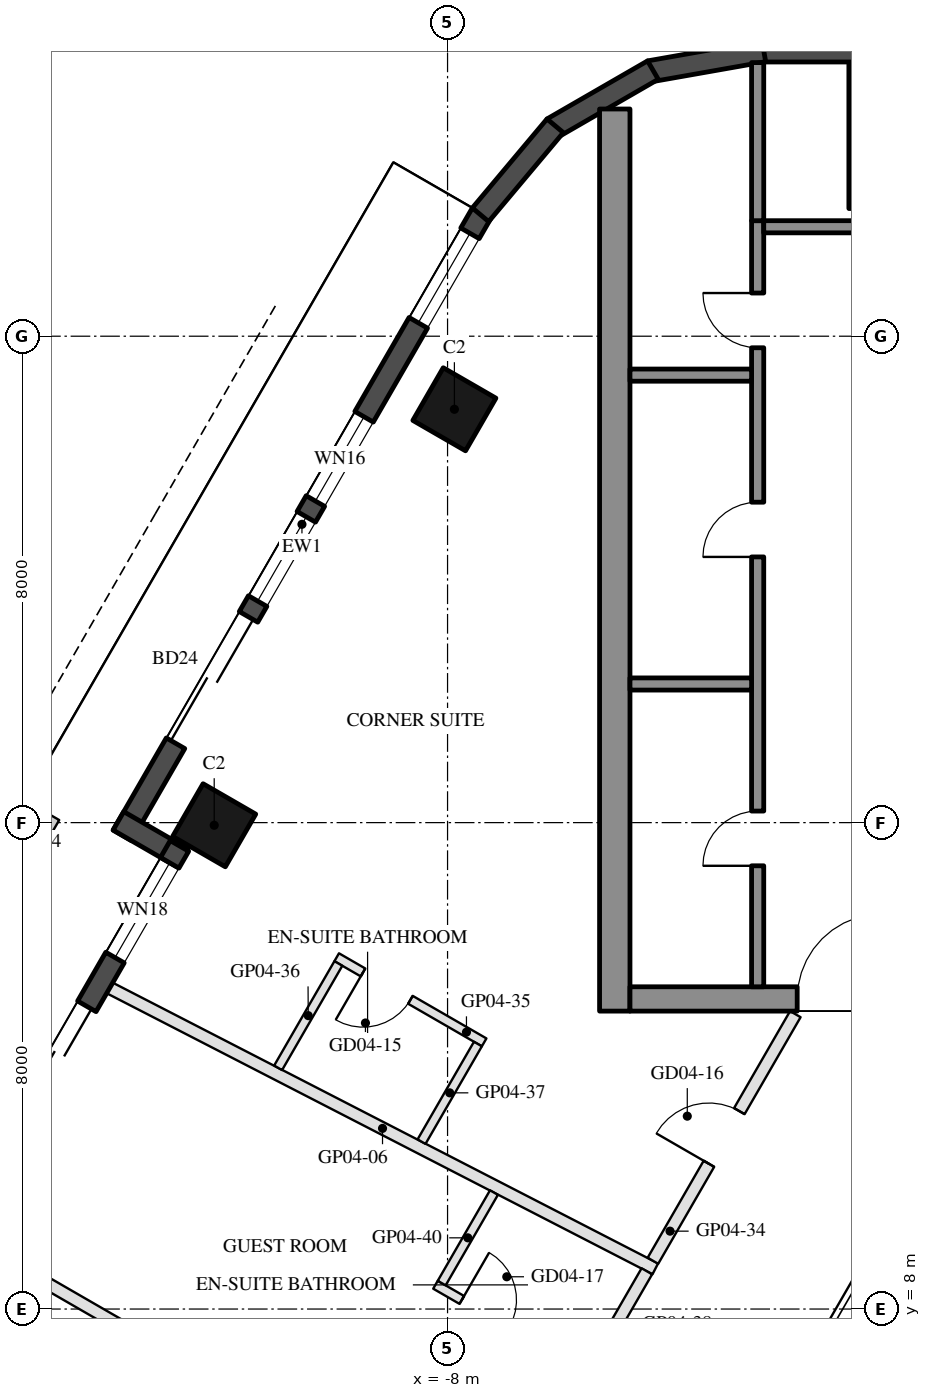
"""IFC4 building model, lengths in metres.
Left out: names, types, materials, properties, quantities, classifications, styles, units other than length and angle.
Written with IfcOpenShell. Run it as: python <this file> out.ifc"""

import sys

from ifc_helpers import new_model, si_unit, direction, frame, frame_2d, origin, origin_2d, place, context, subcontext, project, spatial, rectangle, hollow_rectangle, extrude, element, fill, save


model = new_model("IFC4")
c1 = context("Model", 3, precision=1e-05, world=origin(), true_north=direction((0.0, 1.0)))
c2 = subcontext(c1, "Body", "Model", "MODEL_VIEW")
j1 = project(units=[si_unit("LENGTHUNIT", "METRE"), si_unit("PLANEANGLEUNIT", "RADIAN")], contexts=[c1])
p1 = place(None, origin())
s1 = spatial("IfcSite", under=j1, at=p1, CompositionType="ELEMENT")
p2 = place(p1, origin())
s2 = spatial("IfcBuilding", under=s1, at=p2, CompositionType="ELEMENT")
p3 = place(p2, frame((0.0, 0.0, 76.1)))
s3 = spatial("IfcBuildingStorey", under=s2, at=p3, CompositionType="ELEMENT", Elevation=76.1)
for number, where, z_axis, x_axis in (
    (1, (-7.888, 22.798, 0.0), (0.0, 0.0, 1.0), (0.5, 0.866, 0.0)),
    (2, (-11.838, 15.957, 0.0), (0.0, 0.0, 1.0), (0.5, 0.866, 0.0)),
):
    element("IfcColumn", number, at=place(p3, frame(where, z_axis=z_axis, x_axis=x_axis)), inside=s3, PredefinedType="COLUMN", context=c2, shape_type="SweptSolid", body=[
        extrude(hollow_rectangle(XDim=1.0, YDim=1.0, WallThickness=0.045, at=origin_2d()), origin(), (0.0, 0.0, 1.0), 3.7),
    ])
p4 = place(p3, frame((0.0, 27.3, 0.0), z_axis=(0.0, 0.0, 1.0), x_axis=(1.0, 0.0, 0.0)))
e3 = element("IfcColumn", 3, at=p4, inside=s3, PredefinedType="COLUMN", context=c2, shape_type="SweptSolid", body=[
    extrude(hollow_rectangle(XDim=2.8, YDim=2.4, WallThickness=0.07, at=origin_2d()), origin(), (0.0, 0.0, 1.0), 3.7),
])
p5 = place(p3, frame((-7.441, 26.022, 0.0), z_axis=(0.0, 0.0, 1.0), x_axis=(-0.499992533062, -0.86602971478, 0.0)))
e4 = element("IfcWall", 4, at=p5, inside=s3, PredefinedType="SOLIDWALL", context=c2, shape_type="SweptSolid", body=[
    extrude(rectangle(XDim=11.816, YDim=0.35, at=frame_2d((5.908, 0.0))), origin(), (0.0, 0.0, 1.0), 3.55),
])
p6 = place(p5, frame((0.381, 0.0, 0.3)))
e5 = element("IfcOpeningElement", 5, at=p6, cuts=e4, PredefinedType="OPENING", context=c2, shape_type="SweptSolid", body=[
    extrude(rectangle(XDim=1.7, YDim=2.65, at=frame_2d((0.85, 1.325))), frame((0.0, 0.185, 0.0), z_axis=(0.0, -1.0, 0.0), x_axis=(1.0, 0.0, 0.0)), (0.0, 0.0, 1.0), 0.37),
])
p7 = place(p5, frame((7.666, 0.0, 0.0)))
e6 = element("IfcOpeningElement", 6, at=p7, cuts=e4, PredefinedType="OPENING", context=c2, shape_type="SweptSolid", body=[
    extrude(rectangle(XDim=2.4, YDim=2.4, at=frame_2d((1.2, 1.2))), frame((0.0, 0.185, 0.0), z_axis=(0.0, -1.0, 0.0), x_axis=(1.0, 0.0, 0.0)), (0.0, 0.0, 1.0), 0.37),
])
p8 = place(p5, frame((3.865, 0.0, 0.3)))
e7 = element("IfcOpeningElement", 7, at=p8, cuts=e4, PredefinedType="OPENING", context=c2, shape_type="SweptSolid", body=[
    extrude(rectangle(XDim=1.6, YDim=2.65, at=frame_2d((0.8, 1.325))), frame((0.0, 0.185, 0.0), z_axis=(0.0, -1.0, 0.0), x_axis=(1.0, 0.0, 0.0)), (0.0, 0.0, 1.0), 0.37),
])
p9 = place(p5, frame((5.765, 0.0, 0.3)))
e8 = element("IfcOpeningElement", 8, at=p9, cuts=e4, PredefinedType="OPENING", context=c2, shape_type="SweptSolid", body=[
    extrude(rectangle(XDim=1.6, YDim=2.65, at=frame_2d((0.8, 1.325))), frame((0.0, 0.185, 0.0), z_axis=(0.0, -1.0, 0.0), x_axis=(1.0, 0.0, 0.0)), (0.0, 0.0, 1.0), 0.37),
])
p10 = place(p3, frame((-13.413, 16.029, 0.0), z_axis=(0.0, 0.0, 1.0), x_axis=(0.866005645448, -0.500034220881, 0.0)))
e9 = element("IfcWall", 9, at=p10, inside=s3, PredefinedType="SOLIDWALL", context=c2, shape_type="SweptSolid", body=[
    extrude(rectangle(XDim=1.22, YDim=0.35, at=frame_2d((0.61, 0.0))), origin(), (0.0, 0.0, 1.0), 3.55),
])
p11 = place(p3, frame((-12.409, 15.617, 0.0), z_axis=(0.0, 0.0, 1.0), x_axis=(-0.500003597184, -0.866023326939, 0.0)))
e10 = element("IfcWall", 10, at=p11, inside=s3, PredefinedType="SOLIDWALL", context=c2, shape_type="SweptSolid", body=[
    extrude(rectangle(XDim=6.74, YDim=0.35, at=frame_2d((3.37, 0.0))), origin(), (0.0, 0.0, 1.0), 3.55),
])
p12 = place(p11, frame((0.32, 0.0, 0.3)))
e11 = element("IfcOpeningElement", 11, at=p12, cuts=e10, PredefinedType="OPENING", context=c2, shape_type="SweptSolid", body=[
    extrude(rectangle(XDim=1.8, YDim=2.65, at=frame_2d((0.9, 1.325))), frame((0.0, 0.185, 0.0), z_axis=(0.0, -1.0, 0.0), x_axis=(1.0, 0.0, 0.0)), (0.0, 0.0, 1.0), 0.37),
])
p13 = place(p11, frame((3.047, 0.0, 0.0)))
e12 = element("IfcOpeningElement", 12, at=p13, cuts=e10, PredefinedType="OPENING", context=c2, shape_type="SweptSolid", body=[
    extrude(rectangle(XDim=1.8, YDim=2.4, at=frame_2d((0.9, 1.2))), frame((0.0, 0.185, 0.0), z_axis=(0.0, -1.0, 0.0), x_axis=(1.0, 0.0, 0.0)), (0.0, 0.0, 1.0), 0.37),
])
p14 = place(p11, frame((5.147, 0.0, 0.3)))
e13 = element("IfcOpeningElement", 13, at=p14, cuts=e10, PredefinedType="OPENING", context=c2, shape_type="SweptSolid", body=[
    extrude(rectangle(XDim=0.8, YDim=2.65, at=frame_2d((0.4, 1.325))), frame((0.0, 0.185, 0.0), z_axis=(0.0, -1.0, 0.0), x_axis=(1.0, 0.0, 0.0)), (0.0, 0.0, 1.0), 0.37),
])
p15 = place(p3, frame((2.829, 28.685, 0.0), z_axis=(0.0, 0.0, 1.0), x_axis=(-1.0, 0.0, 0.0)))
e14 = element("IfcWall", 14, at=p15, inside=s3, PredefinedType="SOLIDWALL", context=c2, shape_type="SweptSolid", body=[
    extrude(rectangle(XDim=5.658, YDim=0.35, at=frame_2d((2.829, 0.0))), origin(), (0.0, 0.0, 1.0), 3.55),
])
for number, where, z_axis, x_axis in (
    (15, (-2.799, 28.688, 0.0), (0.0, 0.0, 1.0), (-0.985, -0.174, 0.0)),
    (16, (-4.623, 28.377, 0.0), (0.0, 0.0, 1.0), (-0.866, -0.5, 0.0)),
):
    element("IfcWall", number, at=place(p3, frame(where, z_axis=z_axis, x_axis=x_axis)), inside=s3, PredefinedType="SOLIDWALL", context=c2, shape_type="SweptSolid", body=[
        extrude(rectangle(XDim=1.91, YDim=0.35, at=frame_2d((0.955, 0.0))), origin(), (0.0, 0.0, 1.0), 3.55),
    ])
p16 = place(p3, frame((-6.23, 27.461, 0.0), z_axis=(0.0, 0.0, 1.0), x_axis=(-0.642808304945, -0.766027077259, 0.0)))
e17 = element("IfcWall", 17, at=p16, inside=s3, PredefinedType="SOLIDWALL", context=c2, shape_type="SweptSolid", body=[
    extrude(rectangle(XDim=1.91, YDim=0.35, at=frame_2d((0.955, 0.0))), origin(), (0.0, 0.0, 1.0), 3.55),
])
p17 = place(p3, frame((-5.25, 12.9, 0.0), z_axis=(0.0, 0.0, 1.0), x_axis=(0.0, 1.0, 0.0)))
e18 = element("IfcWall", 18, at=p17, inside=s3, PredefinedType="SHEAR", context=c2, shape_type="SweptSolid", body=[
    extrude(rectangle(XDim=14.837, YDim=0.5, at=frame_2d((7.418, 0.0))), origin(), (0.0, 0.0, 1.0), 3.5),
])
p18 = place(p3, frame((5.0, 13.1, 0.0), z_axis=(0.0, 0.0, 1.0), x_axis=(-1.0, 0.0, 0.0)))
e19 = element("IfcWall", 19, at=p18, inside=s3, PredefinedType="SHEAR", context=c2, shape_type="SweptSolid", body=[
    extrude(rectangle(XDim=10.0, YDim=0.4, at=frame_2d((5.0, 0.0))), origin(), (0.0, 0.0, 1.0), 3.5),
])
p19 = place(p18, frame((3.55, 0.0, 0.0)))
e20 = element("IfcOpeningElement", 20, at=p19, cuts=e19, PredefinedType="OPENING", context=c2, shape_type="SweptSolid", body=[
    extrude(rectangle(XDim=1.1, YDim=2.1, at=frame_2d((0.55, 1.05))), frame((0.0, 0.21, 0.0), z_axis=(0.0, -1.0, 0.0), x_axis=(1.0, 0.0, 0.0)), (0.0, 0.0, 1.0), 0.42),
])
p20 = place(p18, frame((5.85, 0.0, 0.0)))
e21 = element("IfcOpeningElement", 21, at=p20, cuts=e19, PredefinedType="OPENING", context=c2, shape_type="SweptSolid", body=[
    extrude(rectangle(XDim=1.4, YDim=2.1, at=frame_2d((0.7, 1.05))), frame((0.0, 0.21, 0.0), z_axis=(0.0, -1.0, 0.0), x_axis=(1.0, 0.0, 0.0)), (0.0, 0.0, 1.0), 0.42),
])
p21 = place(p3, frame((-2.9, 13.3, 0.0), z_axis=(0.0, 0.0, 1.0), x_axis=(0.0, 1.0, 0.0)))
e22 = element("IfcWall", 22, at=p21, inside=s3, PredefinedType="SHEAR", context=c2, shape_type="SweptSolid", body=[
    extrude(rectangle(XDim=12.6, YDim=0.2, at=frame_2d((6.3, 0.0))), origin(), (0.0, 0.0, 1.0), 3.5),
])
p22 = place(p21, frame((1.99, 0.0, 0.0)))
e23 = element("IfcOpeningElement", 23, at=p22, cuts=e22, PredefinedType="OPENING", context=c2, shape_type="SweptSolid", body=[
    extrude(rectangle(XDim=0.9, YDim=2.1, at=frame_2d((0.45, 1.05))), frame((0.0, 0.11, 0.0), z_axis=(0.0, -1.0, 0.0), x_axis=(1.0, 0.0, 0.0)), (0.0, 0.0, 1.0), 0.22),
])
p23 = place(p21, frame((7.07, 0.0, 0.0)))
e24 = element("IfcOpeningElement", 24, at=p23, cuts=e22, PredefinedType="OPENING", context=c2, shape_type="SweptSolid", body=[
    extrude(rectangle(XDim=0.9, YDim=2.1, at=frame_2d((0.45, 1.05))), frame((0.0, 0.11, 0.0), z_axis=(0.0, -1.0, 0.0), x_axis=(1.0, 0.0, 0.0)), (0.0, 0.0, 1.0), 0.22),
])
p24 = place(p21, frame((10.51, 0.0, 0.0)))
e25 = element("IfcOpeningElement", 25, at=p24, cuts=e22, PredefinedType="OPENING", context=c2, shape_type="SweptSolid", body=[
    extrude(rectangle(XDim=0.9, YDim=2.1, at=frame_2d((0.45, 1.05))), frame((0.0, 0.11, 0.0), z_axis=(0.0, -1.0, 0.0), x_axis=(1.0, 0.0, 0.0)), (0.0, 0.0, 1.0), 0.22),
])
p25 = place(p3, frame((-0.4, 25.8, 0.0), z_axis=(0.0, 0.0, 1.0), x_axis=(-1.0, 0.0, 0.0)))
e26 = element("IfcWall", 26, at=p25, inside=s3, PredefinedType="SHEAR", context=c2, shape_type="SweptSolid", body=[
    extrude(rectangle(XDim=2.4, YDim=0.2, at=frame_2d((1.2, 0.0))), origin(), (0.0, 0.0, 1.0), 3.5),
])
for number, where, z_axis, x_axis in (
    (27, (-3.0, 18.28, 0.0), (0.0, 0.0, 1.0), (-1.0, 0.0, 0.0)),
    (28, (-3.0, 23.36, 0.0), (0.0, 0.0, 1.0), (-1.0, 0.0, 0.0)),
):
    element("IfcWall", number, at=place(p3, frame(where, z_axis=z_axis, x_axis=x_axis)), inside=s3, PredefinedType="SHEAR", context=c2, shape_type="SweptSolid", body=[
        extrude(rectangle(XDim=2.0, YDim=0.2, at=frame_2d((1.0, 0.0))), origin(), (0.0, 0.0, 1.0), 3.5),
    ])
p26 = place(p3, frame((-2.9, 25.9, 0.0), z_axis=(0.0, 0.0, 1.0), x_axis=(0.0, 1.0, 0.0)))
e29 = element("IfcWall", 29, at=p26, inside=s3, PredefinedType="SHEAR", context=c2, shape_type="SweptSolid", body=[
    extrude(rectangle(XDim=2.6, YDim=0.2, at=frame_2d((1.3, 0.0))), origin(), (0.0, 0.0, 1.0), 3.5),
])
p27 = place(p3, frame((-13.556, 13.281, 0.0), z_axis=(0.0, 0.0, 1.0), x_axis=(0.889110909618, -0.457691807223, 0.0)))
e30 = element("IfcWall", 30, at=p27, inside=s3, PredefinedType="PARTITIONING", context=c2, shape_type="SweptSolid", body=[
    extrude(rectangle(XDim=10.092, YDim=0.2, at=frame_2d((5.046, 0.0))), origin(), (0.0, 0.0, 1.0), 2.96),
])
p28 = place(p3, frame((-15.354, 8.865, 0.0), z_axis=(0.0, 0.0, 1.0), x_axis=(0.866018301787, -0.500012300819, 0.0)))
e31 = element("IfcWall", 31, at=p28, inside=s3, PredefinedType="PARTITIONING", context=c2, shape_type="SweptSolid", body=[
    extrude(rectangle(XDim=9.43, YDim=0.2, at=frame_2d((4.715, 0.0))), origin(), (0.0, 0.0, 1.0), 2.95),
])
p29 = place(p3, frame((-4.622, 8.794, 0.0), z_axis=(0.0, 0.0, 1.0), x_axis=(0.499979668266, 0.866037141998, 0.0)))
e32 = element("IfcWall", 32, at=p29, inside=s3, PredefinedType="PARTITIONING", context=c2, shape_type="SweptSolid", body=[
    extrude(rectangle(XDim=4.683, YDim=0.2, at=frame_2d((2.342, 0.0))), origin(), (0.0, 0.0, 1.0), 2.95),
])
p30 = place(p29, frame((1.842, 0.0, 0.0)))
e33 = element("IfcOpeningElement", 33, at=p30, cuts=e32, PredefinedType="OPENING", context=c2, shape_type="SweptSolid", body=[
    extrude(rectangle(XDim=1.0, YDim=2.1, at=frame_2d((0.5, 1.05))), frame((0.0, 0.11, 0.0), z_axis=(0.0, -1.0, 0.0), x_axis=(1.0, 0.0, 0.0)), (0.0, 0.0, 1.0), 0.22),
])
p31 = place(p3, frame((-7.398, 12.386, 0.0), z_axis=(0.0, 0.0, 1.0), x_axis=(-0.866034573852, 0.49998411664, 0.0)))
e34 = element("IfcWall", 34, at=p31, inside=s3, PredefinedType="PARTITIONING", context=c2, shape_type="SweptSolid", body=[
    extrude(rectangle(XDim=2.8, YDim=0.15, at=frame_2d((1.4, 0.0))), origin(), (0.0, 0.0, 1.0), 3.55),
])
p32 = place(p31, frame((1.4, 0.0, 0.0)))
e35 = element("IfcOpeningElement", 35, at=p32, cuts=e34, PredefinedType="OPENING", context=c2, shape_type="SweptSolid", body=[
    extrude(rectangle(XDim=0.9, YDim=2.1, at=frame_2d((0.45, 1.05))), frame((0.0, 0.085, 0.0), z_axis=(0.0, -1.0, 0.0), x_axis=(1.0, 0.0, 0.0)), (0.0, 0.0, 1.0), 0.17),
])
p33 = place(p3, frame((-9.796, 13.683, 0.0), z_axis=(0.0, 0.0, 1.0), x_axis=(-0.499981976687, -0.866035809299, 0.0)))
e36 = element("IfcWall", 36, at=p33, inside=s3, PredefinedType="PARTITIONING", context=c2, shape_type="SweptSolid", body=[
    extrude(rectangle(XDim=1.981, YDim=0.15, at=frame_2d((0.991, 0.0))), origin(), (0.0, 0.0, 1.0), 3.55),
])
p34 = place(p3, frame((-7.501, 12.358, 0.0), z_axis=(0.0, 0.0, 1.0), x_axis=(-0.499992292652, -0.866029853578, 0.0)))
e37 = element("IfcWall", 37, at=p34, inside=s3, PredefinedType="PARTITIONING", context=c2, shape_type="SweptSolid", body=[
    extrude(rectangle(XDim=1.854, YDim=0.15, at=frame_2d((0.927, 0.0))), origin(), (0.0, 0.0, 1.0), 3.55),
])
p35 = place(p3, frame((-7.225, 4.287, 0.0), z_axis=(0.0, 0.0, 1.0), x_axis=(0.49997441339, 0.866040175716, 0.0)))
e38 = element("IfcWall", 38, at=p35, inside=s3, PredefinedType="PARTITIONING", context=c2, shape_type="SweptSolid", body=[
    extrude(rectangle(XDim=5.005, YDim=0.2, at=frame_2d((2.502, 0.0))), origin(), (0.0, 0.0, 1.0), 2.95),
])
p36 = place(p35, frame((1.55, 0.0, 0.0)))
e39 = element("IfcOpeningElement", 39, at=p36, cuts=e38, PredefinedType="OPENING", context=c2, shape_type="SweptSolid", body=[
    extrude(rectangle(XDim=1.0, YDim=2.1, at=frame_2d((0.5, 1.05))), frame((0.0, 0.11, 0.0), z_axis=(0.0, -1.0, 0.0), x_axis=(1.0, 0.0, 0.0)), (0.0, 0.0, 1.0), 0.22),
])
p37 = place(p3, frame((-8.198, 8.399, 0.0), z_axis=(0.0, 0.0, 1.0), x_axis=(0.866034573852, -0.49998411664, 0.0)))
e40 = element("IfcWall", 40, at=p37, inside=s3, PredefinedType="PARTITIONING", context=c2, shape_type="SweptSolid", body=[
    extrude(rectangle(XDim=2.8, YDim=0.15, at=frame_2d((1.4, 0.0))), origin(), (0.0, 0.0, 1.0), 3.55),
])
p38 = place(p37, frame((0.5, 0.0, 0.0)))
e41 = element("IfcOpeningElement", 41, at=p38, cuts=e40, PredefinedType="OPENING", context=c2, shape_type="SweptSolid", body=[
    extrude(rectangle(XDim=0.9, YDim=2.1, at=frame_2d((0.45, 1.05))), frame((0.0, 0.085, 0.0), z_axis=(0.0, -1.0, 0.0), x_axis=(1.0, 0.0, 0.0)), (0.0, 0.0, 1.0), 0.17),
])
p39 = place(p3, frame((-7.237, 9.915, 0.0), z_axis=(0.0, 0.0, 1.0), x_axis=(-0.50005036918, -0.865996321171, 0.0)))
e42 = element("IfcWall", 42, at=p39, inside=s3, PredefinedType="PARTITIONING", context=c2, shape_type="SweptSolid", body=[
    extrude(rectangle(XDim=1.719, YDim=0.15, at=frame_2d((0.859, 0.0))), origin(), (0.0, 0.0, 1.0), 2.95),
])
p40 = place(p6, origin())
e43 = element("IfcWindow", 43, at=p40, inside=s3, PartitioningType="SINGLE_PANEL", PredefinedType="WINDOW", context=c2, shape_type="SweptSolid", body=[
    extrude(rectangle(XDim=1.7, YDim=2.65, at=frame_2d((0.85, 1.325))), frame((0.0, 0.03, 0.0), z_axis=(0.0, -1.0, 0.0), x_axis=(1.0, 0.0, 0.0)), (0.0, 0.0, 1.0), 0.06),
])
fill(e5, e43)
p41 = place(p7, frame((2.4, 0.0, 0.0), z_axis=(0.0, 0.0, 1.0), x_axis=(-1.0, 0.0, 0.0)))
e44 = element("IfcDoor", 44, at=p41, inside=s3, OperationType="SLIDING_TO_LEFT", PredefinedType="DOOR", context=c2, shape_type="SweptSolid", body=[
    extrude(rectangle(XDim=2.4, YDim=2.4, at=frame_2d((1.2, 1.2))), frame((0.0, 0.025, 0.0), z_axis=(0.0, -1.0, 0.0), x_axis=(1.0, 0.0, 0.0)), (0.0, 0.0, 1.0), 0.05),
])
fill(e6, e44)
p42 = place(p8, origin())
e45 = element("IfcWindow", 45, at=p42, inside=s3, PartitioningType="SINGLE_PANEL", PredefinedType="WINDOW", context=c2, shape_type="SweptSolid", body=[
    extrude(rectangle(XDim=1.6, YDim=2.65, at=frame_2d((0.8, 1.325))), frame((0.0, 0.03, 0.0), z_axis=(0.0, -1.0, 0.0), x_axis=(1.0, 0.0, 0.0)), (0.0, 0.0, 1.0), 0.06),
])
fill(e7, e45)
p43 = place(p9, origin())
e46 = element("IfcWindow", 46, at=p43, inside=s3, PartitioningType="SINGLE_PANEL", PredefinedType="WINDOW", context=c2, shape_type="SweptSolid", body=[
    extrude(rectangle(XDim=1.6, YDim=2.65, at=frame_2d((0.8, 1.325))), frame((0.0, 0.03, 0.0), z_axis=(0.0, -1.0, 0.0), x_axis=(1.0, 0.0, 0.0)), (0.0, 0.0, 1.0), 0.06),
])
fill(e8, e46)
p44 = place(p12, origin())
e47 = element("IfcWindow", 47, at=p44, inside=s3, PartitioningType="SINGLE_PANEL", PredefinedType="WINDOW", context=c2, shape_type="SweptSolid", body=[
    extrude(rectangle(XDim=1.8, YDim=2.65, at=frame_2d((0.9, 1.325))), frame((0.0, 0.03, 0.0), z_axis=(0.0, -1.0, 0.0), x_axis=(1.0, 0.0, 0.0)), (0.0, 0.0, 1.0), 0.06),
])
fill(e11, e47)
p45 = place(p13, frame((1.8, 0.0, 0.0), z_axis=(0.0, 0.0, 1.0), x_axis=(-1.0, 0.0, 0.0)))
e48 = element("IfcDoor", 48, at=p45, inside=s3, OperationType="SLIDING_TO_LEFT", PredefinedType="DOOR", context=c2, shape_type="SweptSolid", body=[
    extrude(rectangle(XDim=1.8, YDim=2.4, at=frame_2d((0.9, 1.2))), frame((0.0, 0.025, 0.0), z_axis=(0.0, -1.0, 0.0), x_axis=(1.0, 0.0, 0.0)), (0.0, 0.0, 1.0), 0.05),
])
fill(e12, e48)
p46 = place(p22, origin())
e49 = element("IfcDoor", 49, at=p46, inside=s3, OperationType="SINGLE_SWING_LEFT", PredefinedType="DOOR", context=c2, shape_type="SweptSolid", body=[
    extrude(rectangle(XDim=0.9, YDim=2.1, at=frame_2d((0.45, 1.05))), frame((0.0, 0.025, 0.0), z_axis=(0.0, -1.0, 0.0), x_axis=(1.0, 0.0, 0.0)), (0.0, 0.0, 1.0), 0.05),
])
fill(e23, e49)
p47 = place(p23, origin())
e50 = element("IfcDoor", 50, at=p47, inside=s3, OperationType="SINGLE_SWING_LEFT", PredefinedType="DOOR", context=c2, shape_type="SweptSolid", body=[
    extrude(rectangle(XDim=0.9, YDim=2.1, at=frame_2d((0.45, 1.05))), frame((0.0, 0.025, 0.0), z_axis=(0.0, -1.0, 0.0), x_axis=(1.0, 0.0, 0.0)), (0.0, 0.0, 1.0), 0.05),
])
fill(e24, e50)
p48 = place(p24, origin())
e51 = element("IfcDoor", 51, at=p48, inside=s3, OperationType="SINGLE_SWING_RIGHT", PredefinedType="DOOR", context=c2, shape_type="SweptSolid", body=[
    extrude(rectangle(XDim=0.9, YDim=2.1, at=frame_2d((0.45, 1.05))), frame((0.0, 0.025, 0.0), z_axis=(0.0, -1.0, 0.0), x_axis=(1.0, 0.0, 0.0)), (0.0, 0.0, 1.0), 0.05),
])
fill(e25, e51)
p49 = place(p20, frame((1.4, 0.0, 0.0), z_axis=(0.0, 0.0, 1.0), x_axis=(-1.0, 0.0, 0.0)))
e52 = element("IfcDoor", 52, at=p49, inside=s3, OperationType="DOUBLE_DOOR_SINGLE_SWING", PredefinedType="DOOR", context=c2, shape_type="SweptSolid", body=[
    extrude(rectangle(XDim=1.4, YDim=2.1, at=frame_2d((0.7, 1.05))), frame((0.0, 0.025, 0.0), z_axis=(0.0, -1.0, 0.0), x_axis=(1.0, 0.0, 0.0)), (0.0, 0.0, 1.0), 0.05),
])
fill(e21, e52)
p50 = place(p32, origin())
e53 = element("IfcDoor", 53, at=p50, inside=s3, OperationType="SINGLE_SWING_RIGHT", PredefinedType="DOOR", context=c2, shape_type="SweptSolid", body=[
    extrude(rectangle(XDim=0.9, YDim=2.1, at=frame_2d((0.45, 1.05))), frame((0.0, 0.025, 0.0), z_axis=(0.0, -1.0, 0.0), x_axis=(1.0, 0.0, 0.0)), (0.0, 0.0, 1.0), 0.05),
])
fill(e35, e53)
p51 = place(p30, origin())
e54 = element("IfcDoor", 54, at=p51, inside=s3, OperationType="SINGLE_SWING_LEFT", PredefinedType="DOOR", context=c2, shape_type="SweptSolid", body=[
    extrude(rectangle(XDim=1.0, YDim=2.1, at=frame_2d((0.5, 1.05))), frame((0.0, 0.025, 0.0), z_axis=(0.0, -1.0, 0.0), x_axis=(1.0, 0.0, 0.0)), (0.0, 0.0, 1.0), 0.05),
])
fill(e33, e54)
p52 = place(p38, origin())
e55 = element("IfcDoor", 55, at=p52, inside=s3, OperationType="SINGLE_SWING_LEFT", PredefinedType="DOOR", context=c2, shape_type="SweptSolid", body=[
    extrude(rectangle(XDim=0.9, YDim=2.1, at=frame_2d((0.45, 1.05))), frame((0.0, 0.025, 0.0), z_axis=(0.0, -1.0, 0.0), x_axis=(1.0, 0.0, 0.0)), (0.0, 0.0, 1.0), 0.05),
])
fill(e41, e55)
save(model, sys.argv[1])
